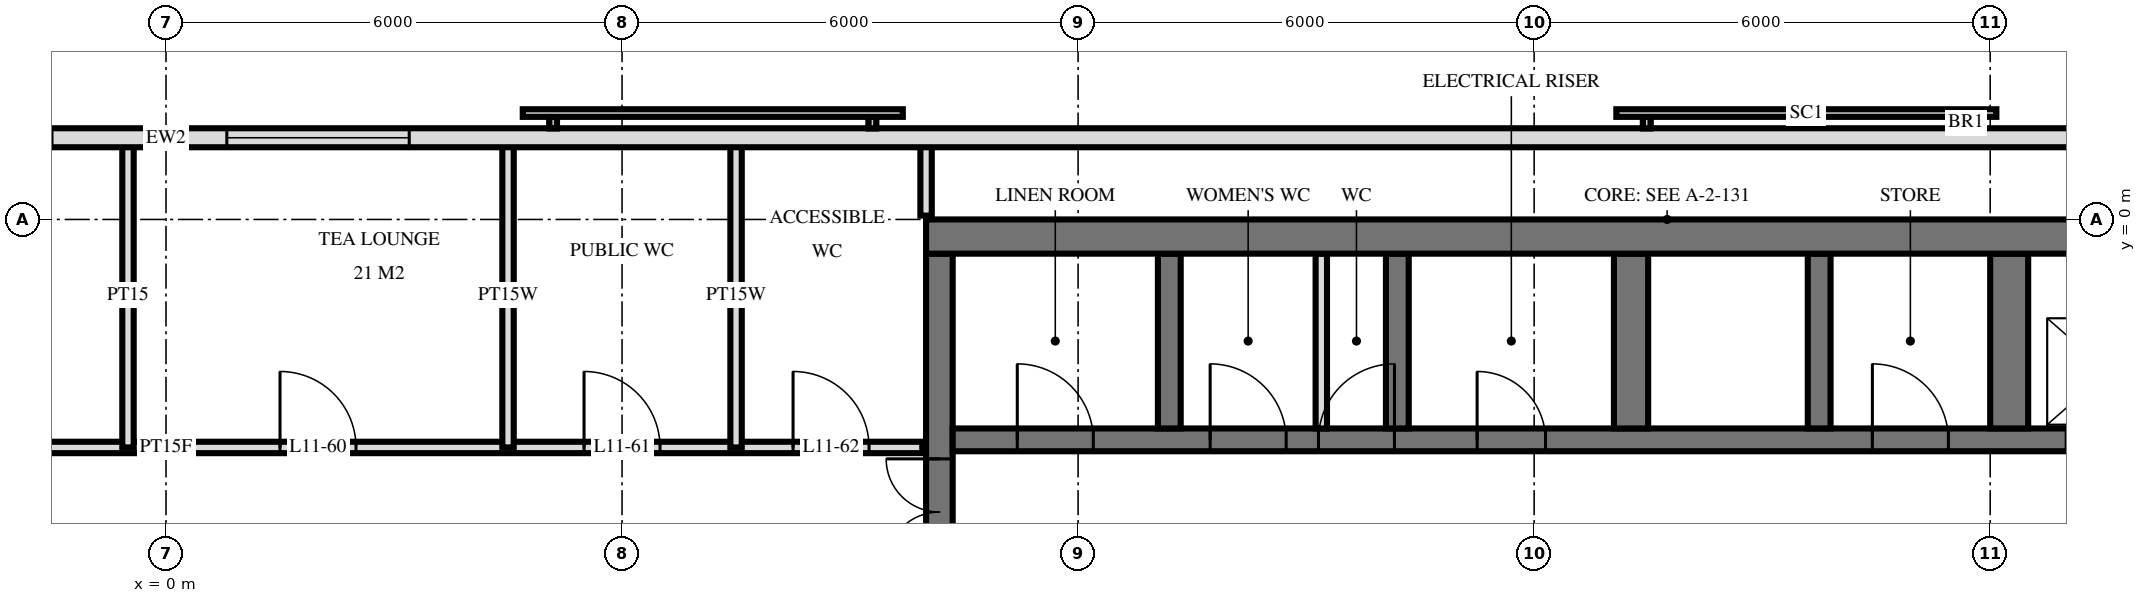
"""IFC4 building model, lengths in metres.
Left out: names, types, materials, properties, quantities, classifications, styles, units other than length and angle.
Written with IfcOpenShell. Run it as: python <this file> out.ifc"""

import sys

from ifc_helpers import new_model, si_unit, direction, frame, frame_2d, origin, place, context, subcontext, project, spatial, rectangle, extrude, element, fill, save


model = new_model("IFC4")
c1 = context("Model", 3, precision=1e-05, world=origin(), true_north=direction((0.0, 1.0)))
c2 = subcontext(c1, "Body", "Model", "MODEL_VIEW")
j1 = project(units=[si_unit("LENGTHUNIT", "METRE"), si_unit("PLANEANGLEUNIT", "RADIAN")], contexts=[c1])
p1 = place(None, origin())
s1 = spatial("IfcSite", under=j1, at=p1, CompositionType="ELEMENT")
p2 = place(p1, origin())
s2 = spatial("IfcBuilding", under=s1, at=p2, CompositionType="ELEMENT")
p3 = place(p2, frame((0.0, 0.0, 49.2)))
s3 = spatial("IfcBuildingStorey", under=s2, at=p3, CompositionType="ELEMENT", Elevation=49.2)
p4 = place(p3, frame((10.0, -0.225, 0.0), z_axis=(0.0, 0.0, 1.0), x_axis=(1.0, 0.0, 0.0)))
e1 = element("IfcWall", 1, at=p4, inside=s3, PredefinedType="SHEAR", context=c2, shape_type="SweptSolid", body=[
    extrude(rectangle(XDim=19.5, YDim=0.45, at=frame_2d((9.75, 0.0))), origin(), (0.0, 0.0, 1.0), 3.6),
])
p5 = place(p3, frame((10.175, -14.55, 0.0), z_axis=(0.0, 0.0, 1.0), x_axis=(0.0, 1.0, 0.0)))
e2 = element("IfcWall", 2, at=p5, inside=s3, PredefinedType="SHEAR", context=c2, shape_type="SweptSolid", body=[
    extrude(rectangle(XDim=14.1, YDim=0.35, at=frame_2d((7.05, 0.0))), origin(), (0.0, 0.0, 1.0), 3.6),
])
p6 = place(p5, frame((8.4, 0.0, 0.0)))
e3 = element("IfcOpeningElement", 3, at=p6, cuts=e2, PredefinedType="OPENING", context=c2, shape_type="SweptSolid", body=[
    extrude(rectangle(XDim=1.4, YDim=2.4, at=frame_2d((0.7, 1.2))), frame((0.0, 0.185, 0.0), z_axis=(0.0, -1.0, 0.0), x_axis=(1.0, 0.0, 0.0)), (0.0, 0.0, 1.0), 0.37),
])
p7 = place(p5, frame((10.0, 0.0, 0.0)))
e4 = element("IfcOpeningElement", 4, at=p7, cuts=e2, PredefinedType="OPENING", context=c2, shape_type="SweptSolid", body=[
    extrude(rectangle(XDim=1.4, YDim=2.4, at=frame_2d((0.7, 1.2))), frame((0.0, 0.185, 0.0), z_axis=(0.0, -1.0, 0.0), x_axis=(1.0, 0.0, 0.0)), (0.0, 0.0, 1.0), 0.37),
])
p8 = place(p5, frame((4.0, 0.0, 0.0)))
e5 = element("IfcOpeningElement", 5, at=p8, cuts=e2, PredefinedType="OPENING", context=c2, shape_type="SweptSolid", body=[
    extrude(rectangle(XDim=1.2, YDim=2.1, at=frame_2d((0.6, 1.05))), frame((0.0, 0.185, 0.0), z_axis=(0.0, -1.0, 0.0), x_axis=(1.0, 0.0, 0.0)), (0.0, 0.0, 1.0), 0.37),
])
p9 = place(p3, frame((10.35, -2.9, 0.0), z_axis=(0.0, 0.0, 1.0), x_axis=(1.0, 0.0, 0.0)))
e6 = element("IfcWall", 6, at=p9, inside=s3, PredefinedType="SHEAR", context=c2, shape_type="SweptSolid", body=[
    extrude(rectangle(XDim=18.7, YDim=0.3, at=frame_2d((9.35, 0.0))), origin(), (0.0, 0.0, 1.0), 3.6),
])
p10 = place(p9, frame((14.65, 0.0, 0.0)))
e7 = element("IfcOpeningElement", 7, at=p10, cuts=e6, PredefinedType="OPENING", context=c2, shape_type="SweptSolid", body=[
    extrude(rectangle(XDim=1.1, YDim=2.1, at=frame_2d((0.55, 1.05))), frame((0.0, 0.16, 0.0), z_axis=(0.0, -1.0, 0.0), x_axis=(1.0, 0.0, 0.0)), (0.0, 0.0, 1.0), 0.32),
])
p11 = place(p9, frame((17.05, 0.0, 0.0)))
e8 = element("IfcOpeningElement", 8, at=p11, cuts=e6, PredefinedType="OPENING", context=c2, shape_type="SweptSolid", body=[
    extrude(rectangle(XDim=1.1, YDim=2.1, at=frame_2d((0.55, 1.05))), frame((0.0, 0.16, 0.0), z_axis=(0.0, -1.0, 0.0), x_axis=(1.0, 0.0, 0.0)), (0.0, 0.0, 1.0), 0.32),
])
p12 = place(p9, frame((6.9, 0.0, 0.0)))
e9 = element("IfcOpeningElement", 9, at=p12, cuts=e6, PredefinedType="OPENING", context=c2, shape_type="SweptSolid", body=[
    extrude(rectangle(XDim=0.9, YDim=2.1, at=frame_2d((0.45, 1.05))), frame((0.0, 0.16, 0.0), z_axis=(0.0, -1.0, 0.0), x_axis=(1.0, 0.0, 0.0)), (0.0, 0.0, 1.0), 0.32),
])
p13 = place(p9, frame((0.85, 0.0, 0.0)))
e10 = element("IfcOpeningElement", 10, at=p13, cuts=e6, PredefinedType="OPENING", context=c2, shape_type="SweptSolid", body=[
    extrude(rectangle(XDim=1.0, YDim=2.1, at=frame_2d((0.5, 1.05))), frame((0.0, 0.16, 0.0), z_axis=(0.0, -1.0, 0.0), x_axis=(1.0, 0.0, 0.0)), (0.0, 0.0, 1.0), 0.32),
])
p14 = place(p9, frame((3.387, 0.0, 0.0)))
e11 = element("IfcOpeningElement", 11, at=p14, cuts=e6, PredefinedType="OPENING", context=c2, shape_type="SweptSolid", body=[
    extrude(rectangle(XDim=1.0, YDim=2.1, at=frame_2d((0.5, 1.05))), frame((0.0, 0.16, 0.0), z_axis=(0.0, -1.0, 0.0), x_axis=(1.0, 0.0, 0.0)), (0.0, 0.0, 1.0), 0.32),
])
p15 = place(p9, frame((4.812, 0.0, 0.0)))
e12 = element("IfcOpeningElement", 12, at=p15, cuts=e6, PredefinedType="OPENING", context=c2, shape_type="SweptSolid", body=[
    extrude(rectangle(XDim=1.0, YDim=2.1, at=frame_2d((0.5, 1.05))), frame((0.0, 0.16, 0.0), z_axis=(0.0, -1.0, 0.0), x_axis=(1.0, 0.0, 0.0)), (0.0, 0.0, 1.0), 0.32),
])
p16 = place(p9, frame((12.1, 0.0, 0.0)))
e13 = element("IfcOpeningElement", 13, at=p16, cuts=e6, PredefinedType="OPENING", context=c2, shape_type="SweptSolid", body=[
    extrude(rectangle(XDim=1.0, YDim=2.1, at=frame_2d((0.5, 1.05))), frame((0.0, 0.16, 0.0), z_axis=(0.0, -1.0, 0.0), x_axis=(1.0, 0.0, 0.0)), (0.0, 0.0, 1.0), 0.32),
])
for number, where, z_axis, x_axis in (
    (14, (13.2, -2.75, 0.0), (0.0, 0.0, 1.0), (0.0, 1.0, 0.0)),
    (15, (16.2, -2.75, 0.0), (0.0, 0.0, 1.0), (0.0, 1.0, 0.0)),
):
    element("IfcWall", number, at=place(p3, frame(where, z_axis=z_axis, x_axis=x_axis)), inside=s3, PredefinedType="SHEAR", context=c2, shape_type="SweptSolid", body=[
        extrude(rectangle(XDim=2.3, YDim=0.3, at=frame_2d((1.15, 0.0))), origin(), (0.0, 0.0, 1.0), 3.6),
    ])
p17 = place(p3, frame((19.275, -2.75, 0.0), z_axis=(0.0, 0.0, 1.0), x_axis=(0.0, 1.0, 0.0)))
e16 = element("IfcWall", 16, at=p17, inside=s3, PredefinedType="SHEAR", context=c2, shape_type="SweptSolid", body=[
    extrude(rectangle(XDim=2.3, YDim=0.45, at=frame_2d((1.15, 0.0))), origin(), (0.0, 0.0, 1.0), 3.6),
])
p18 = place(p3, frame((21.75, -2.75, 0.0), z_axis=(0.0, 0.0, 1.0), x_axis=(0.0, 1.0, 0.0)))
e17 = element("IfcWall", 17, at=p18, inside=s3, PredefinedType="SHEAR", context=c2, shape_type="SweptSolid", body=[
    extrude(rectangle(XDim=2.3, YDim=0.3, at=frame_2d((1.15, 0.0))), origin(), (0.0, 0.0, 1.0), 3.6),
])
p19 = place(p3, frame((24.25, -2.75, 0.0), z_axis=(0.0, 0.0, 1.0), x_axis=(0.0, 1.0, 0.0)))
e18 = element("IfcWall", 18, at=p19, inside=s3, PredefinedType="SHEAR", context=c2, shape_type="SweptSolid", body=[
    extrude(rectangle(XDim=2.3, YDim=0.5, at=frame_2d((1.15, 0.0))), origin(), (0.0, 0.0, 1.0), 3.6),
])
p20 = place(p3, frame((28.775, 1.075, 0.0), z_axis=(0.0, 0.0, 1.0), x_axis=(-1.0, 0.0, 0.0)))
e19 = element("IfcWall", 19, at=p20, inside=s3, PredefinedType="SOLIDWALL", context=c2, shape_type="SweptSolid", body=[
    extrude(rectangle(XDim=57.551, YDim=0.25, at=frame_2d((28.775, 0.0))), origin(), (0.0, 0.0, 1.0), 3.32),
])
p21 = place(p20, frame((25.575, 0.0, 0.3)))
e20 = element("IfcOpeningElement", 20, at=p21, cuts=e19, PredefinedType="OPENING", context=c2, shape_type="SweptSolid", body=[
    extrude(rectangle(XDim=2.4, YDim=2.1, at=frame_2d((1.2, 1.05))), frame((0.0, 0.135, 0.0), z_axis=(0.0, -1.0, 0.0), x_axis=(1.0, 0.0, 0.0)), (0.0, 0.0, 1.0), 0.27),
])
p22 = place(p20, frame((30.275, 0.0, 0.3)))
e21 = element("IfcOpeningElement", 21, at=p22, cuts=e19, PredefinedType="OPENING", context=c2, shape_type="SweptSolid", body=[
    extrude(rectangle(XDim=2.4, YDim=2.1, at=frame_2d((1.2, 1.05))), frame((0.0, 0.135, 0.0), z_axis=(0.0, -1.0, 0.0), x_axis=(1.0, 0.0, 0.0)), (0.0, 0.0, 1.0), 0.27),
])
p23 = place(p20, frame((33.275, 0.0, 0.3)))
e22 = element("IfcOpeningElement", 22, at=p23, cuts=e19, PredefinedType="OPENING", context=c2, shape_type="SweptSolid", body=[
    extrude(rectangle(XDim=2.4, YDim=2.1, at=frame_2d((1.2, 1.05))), frame((0.0, 0.135, 0.0), z_axis=(0.0, -1.0, 0.0), x_axis=(1.0, 0.0, 0.0)), (0.0, 0.0, 1.0), 0.27),
])
p24 = place(p3, frame((15.2, -2.75, 0.0), z_axis=(0.0, 0.0, 1.0), x_axis=(0.0, 1.0, 0.0)))
e23 = element("IfcWall", 23, at=p24, inside=s3, PredefinedType="PARTITIONING", context=c2, shape_type="SweptSolid", body=[
    extrude(rectangle(XDim=2.3, YDim=0.15, at=frame_2d((1.15, 0.0))), origin(), (0.0, 0.0, 1.0), 3.3),
])
p25 = place(p3, frame((10.0, 0.05, 0.0), z_axis=(0.0, 0.0, 1.0), x_axis=(0.0, 1.0, 0.0)))
e24 = element("IfcWall", 24, at=p25, inside=s3, PredefinedType="PLUMBINGWALL", context=c2, shape_type="SweptSolid", body=[
    extrude(rectangle(XDim=0.97, YDim=0.15, at=frame_2d((0.485, 0.0))), origin(), (0.0, 0.0, 1.0), 3.32),
])
for number, where, z_axis, x_axis in (
    (25, (7.5, -3.0, 0.0), (0.0, 0.0, 1.0), (0.0, 1.0, 0.0)),
    (26, (4.5, -3.0, 0.0), (0.0, 0.0, 1.0), (0.0, 1.0, 0.0)),
):
    element("IfcWall", number, at=place(p3, frame(where, z_axis=z_axis, x_axis=x_axis)), inside=s3, PredefinedType="PLUMBINGWALL", context=c2, shape_type="SweptSolid", body=[
        extrude(rectangle(XDim=4.02, YDim=0.15, at=frame_2d((2.01, 0.0))), origin(), (0.0, 0.0, 1.0), 3.32),
    ])
p26 = place(p3, frame((-0.5, -3.0, 0.0), z_axis=(0.0, 0.0, 1.0), x_axis=(0.0, 1.0, 0.0)))
e27 = element("IfcWall", 27, at=p26, inside=s3, PredefinedType="PARTITIONING", context=c2, shape_type="SweptSolid", body=[
    extrude(rectangle(XDim=4.02, YDim=0.15, at=frame_2d((2.01, 0.0))), origin(), (0.0, 0.0, 1.0), 3.32),
])
p27 = place(p3, frame((-9.95, -3.0, 0.0), z_axis=(0.0, 0.0, 1.0), x_axis=(1.0, 0.0, 0.0)))
e28 = element("IfcWall", 28, at=p27, inside=s3, PredefinedType="PARTITIONING", context=c2, shape_type="SweptSolid", body=[
    extrude(rectangle(XDim=19.9, YDim=0.15, at=frame_2d((9.95, 0.0))), origin(), (0.0, 0.0, 1.0), 3.32),
])
p28 = place(p27, frame((4.2, 0.0, 0.0)))
e29 = element("IfcOpeningElement", 29, at=p28, cuts=e28, PredefinedType="OPENING", context=c2, shape_type="SweptSolid", body=[
    extrude(rectangle(XDim=1.0, YDim=2.1, at=frame_2d((0.5, 1.05))), frame((0.0, 0.085, 0.0), z_axis=(0.0, -1.0, 0.0), x_axis=(1.0, 0.0, 0.0)), (0.0, 0.0, 1.0), 0.17),
])
p29 = place(p27, frame((11.45, 0.0, 0.0)))
e30 = element("IfcOpeningElement", 30, at=p29, cuts=e28, PredefinedType="OPENING", context=c2, shape_type="SweptSolid", body=[
    extrude(rectangle(XDim=1.0, YDim=2.1, at=frame_2d((0.5, 1.05))), frame((0.0, 0.085, 0.0), z_axis=(0.0, -1.0, 0.0), x_axis=(1.0, 0.0, 0.0)), (0.0, 0.0, 1.0), 0.17),
])
p30 = place(p27, frame((15.45, 0.0, 0.0)))
e31 = element("IfcOpeningElement", 31, at=p30, cuts=e28, PredefinedType="OPENING", context=c2, shape_type="SweptSolid", body=[
    extrude(rectangle(XDim=1.0, YDim=2.1, at=frame_2d((0.5, 1.05))), frame((0.0, 0.085, 0.0), z_axis=(0.0, -1.0, 0.0), x_axis=(1.0, 0.0, 0.0)), (0.0, 0.0, 1.0), 0.17),
])
p31 = place(p27, frame((18.2, 0.0, 0.0)))
e32 = element("IfcOpeningElement", 32, at=p31, cuts=e28, PredefinedType="OPENING", context=c2, shape_type="SweptSolid", body=[
    extrude(rectangle(XDim=1.0, YDim=2.1, at=frame_2d((0.5, 1.05))), frame((0.0, 0.085, 0.0), z_axis=(0.0, -1.0, 0.0), x_axis=(1.0, 0.0, 0.0)), (0.0, 0.0, 1.0), 0.17),
])
p32 = place(p21, origin())
e33 = element("IfcWindow", 33, at=p32, inside=s3, PartitioningType="SINGLE_PANEL", PredefinedType="WINDOW", context=c2, shape_type="SweptSolid", body=[
    extrude(rectangle(XDim=2.4, YDim=2.1, at=frame_2d((1.2, 1.05))), frame((0.0, 0.03, 0.0), z_axis=(0.0, -1.0, 0.0), x_axis=(1.0, 0.0, 0.0)), (0.0, 0.0, 1.0), 0.06),
])
fill(e20, e33)
p33 = place(p7, origin())
e34 = element("IfcDoor", 34, at=p33, inside=s3, OperationType="DOUBLE_DOOR_SINGLE_SWING", PredefinedType="DOOR", context=c2, shape_type="SweptSolid", body=[
    extrude(rectangle(XDim=1.4, YDim=2.4, at=frame_2d((0.7, 1.2))), frame((0.0, 0.025, 0.0), z_axis=(0.0, -1.0, 0.0), x_axis=(1.0, 0.0, 0.0)), (0.0, 0.0, 1.0), 0.05),
])
fill(e4, e34)
p34 = place(p12, origin())
e35 = element("IfcDoor", 35, at=p34, inside=s3, OperationType="SINGLE_SWING_RIGHT", PredefinedType="DOOR", context=c2, shape_type="SweptSolid", body=[
    extrude(rectangle(XDim=0.9, YDim=2.1, at=frame_2d((0.45, 1.05))), frame((0.0, 0.025, 0.0), z_axis=(0.0, -1.0, 0.0), x_axis=(1.0, 0.0, 0.0)), (0.0, 0.0, 1.0), 0.05),
])
fill(e9, e35)
p35 = place(p13, origin())
e36 = element("IfcDoor", 36, at=p35, inside=s3, OperationType="SINGLE_SWING_RIGHT", PredefinedType="DOOR", context=c2, shape_type="SweptSolid", body=[
    extrude(rectangle(XDim=1.0, YDim=2.1, at=frame_2d((0.5, 1.05))), frame((0.0, 0.025, 0.0), z_axis=(0.0, -1.0, 0.0), x_axis=(1.0, 0.0, 0.0)), (0.0, 0.0, 1.0), 0.05),
])
fill(e10, e36)
p36 = place(p14, origin())
e37 = element("IfcDoor", 37, at=p36, inside=s3, OperationType="SINGLE_SWING_RIGHT", PredefinedType="DOOR", context=c2, shape_type="SweptSolid", body=[
    extrude(rectangle(XDim=1.0, YDim=2.1, at=frame_2d((0.5, 1.05))), frame((0.0, 0.025, 0.0), z_axis=(0.0, -1.0, 0.0), x_axis=(1.0, 0.0, 0.0)), (0.0, 0.0, 1.0), 0.05),
])
fill(e11, e37)
p37 = place(p15, origin())
e38 = element("IfcDoor", 38, at=p37, inside=s3, OperationType="SINGLE_SWING_LEFT", PredefinedType="DOOR", context=c2, shape_type="SweptSolid", body=[
    extrude(rectangle(XDim=1.0, YDim=2.1, at=frame_2d((0.5, 1.05))), frame((0.0, 0.025, 0.0), z_axis=(0.0, -1.0, 0.0), x_axis=(1.0, 0.0, 0.0)), (0.0, 0.0, 1.0), 0.05),
])
fill(e12, e38)
p38 = place(p16, origin())
e39 = element("IfcDoor", 39, at=p38, inside=s3, OperationType="SINGLE_SWING_RIGHT", PredefinedType="DOOR", context=c2, shape_type="SweptSolid", body=[
    extrude(rectangle(XDim=1.0, YDim=2.1, at=frame_2d((0.5, 1.05))), frame((0.0, 0.025, 0.0), z_axis=(0.0, -1.0, 0.0), x_axis=(1.0, 0.0, 0.0)), (0.0, 0.0, 1.0), 0.05),
])
fill(e13, e39)
p39 = place(p29, origin())
e40 = element("IfcDoor", 40, at=p39, inside=s3, OperationType="SINGLE_SWING_RIGHT", PredefinedType="DOOR", context=c2, shape_type="SweptSolid", body=[
    extrude(rectangle(XDim=1.0, YDim=2.1, at=frame_2d((0.5, 1.05))), frame((0.0, 0.025, 0.0), z_axis=(0.0, -1.0, 0.0), x_axis=(1.0, 0.0, 0.0)), (0.0, 0.0, 1.0), 0.05),
])
fill(e30, e40)
p40 = place(p30, origin())
e41 = element("IfcDoor", 41, at=p40, inside=s3, OperationType="SINGLE_SWING_RIGHT", PredefinedType="DOOR", context=c2, shape_type="SweptSolid", body=[
    extrude(rectangle(XDim=1.0, YDim=2.1, at=frame_2d((0.5, 1.05))), frame((0.0, 0.025, 0.0), z_axis=(0.0, -1.0, 0.0), x_axis=(1.0, 0.0, 0.0)), (0.0, 0.0, 1.0), 0.05),
])
fill(e31, e41)
p41 = place(p31, origin())
e42 = element("IfcDoor", 42, at=p41, inside=s3, OperationType="SINGLE_SWING_RIGHT", PredefinedType="DOOR", context=c2, shape_type="SweptSolid", body=[
    extrude(rectangle(XDim=1.0, YDim=2.1, at=frame_2d((0.5, 1.05))), frame((0.0, 0.025, 0.0), z_axis=(0.0, -1.0, 0.0), x_axis=(1.0, 0.0, 0.0)), (0.0, 0.0, 1.0), 0.05),
])
fill(e32, e42)
save(model, sys.argv[1])
